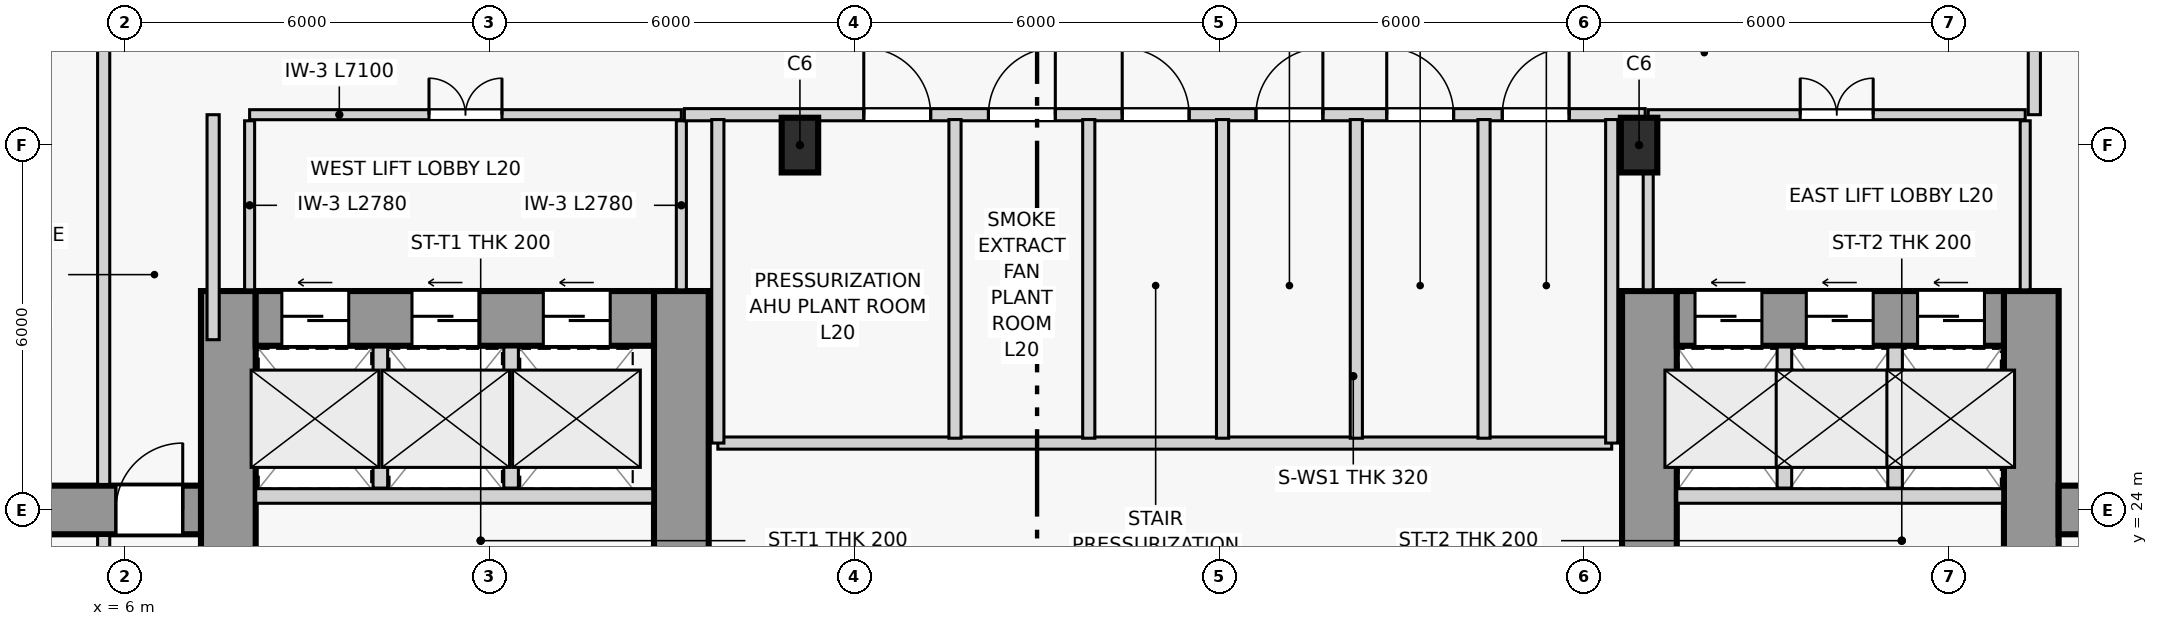
"""IFC4 building model, lengths in metres.
Left out: names, types, materials, properties, quantities, classifications, styles, units other than length and angle.
Written with IfcOpenShell. Run it as: python <this file> out.ifc"""

import sys

from ifc_helpers import new_model, si_unit, direction, frame, frame_2d, origin, origin_2d, place, context, subcontext, project, spatial, rectangle, extrude, source, transform, mapped, element, fill, save


model = new_model("IFC4")
c1 = context("Model", 3, precision=1e-05, world=origin(), true_north=direction((0.0, 1.0)))
c2 = subcontext(c1, "Body", "Model", "MODEL_VIEW")
j1 = project(units=[si_unit("LENGTHUNIT", "METRE"), si_unit("PLANEANGLEUNIT", "RADIAN")], contexts=[c1])
p1 = place(None, origin())
s1 = spatial("IfcSite", under=j1, at=p1, CompositionType="ELEMENT")
p2 = place(p1, origin())
s2 = spatial("IfcBuilding", under=s1, at=p2, CompositionType="ELEMENT")
p3 = place(p2, frame((0.0, 0.0, 76.5)))
s3 = spatial("IfcBuildingStorey", under=s2, at=p3, CompositionType="ELEMENT", Elevation=76.5)
p4 = place(p3, frame((7.7, 14.45, 0.0), z_axis=(0.0, 0.0, 1.0), x_axis=(0.0, 1.0, 0.0)))
e1 = element("IfcWall", 1, at=p4, inside=s3, PredefinedType="SHEAR", context=c2, shape_type="SweptSolid", body=[
    extrude(rectangle(XDim=13.15, YDim=0.9, at=frame_2d((6.575, 0.0))), origin(), (0.0, 0.0, 1.0), 7.2),
])
p5 = place(p3, frame((15.15, 14.45, 0.0), z_axis=(0.0, 0.0, 1.0), x_axis=(0.0, 1.0, 0.0)))
e2 = element("IfcWall", 2, at=p5, inside=s3, PredefinedType="SHEAR", context=c2, shape_type="SweptSolid", body=[
    extrude(rectangle(XDim=13.15, YDim=0.9, at=frame_2d((6.575, 0.0))), origin(), (0.0, 0.0, 1.0), 7.2),
])
p6 = place(p5, frame((5.65, 0.0, 0.0)))
e3 = element("IfcOpeningElement", 3, at=p6, cuts=e2, PredefinedType="OPENING", context=c2, shape_type="SweptSolid", body=[
    extrude(rectangle(XDim=1.1, YDim=2.2, at=frame_2d((0.55, 1.1))), frame((0.0, 0.46, 0.0), z_axis=(0.0, -1.0, 0.0), x_axis=(1.0, 0.0, 0.0)), (0.0, 0.0, 1.0), 0.92),
])
p7 = place(p3, frame((8.15, 27.15, 0.0), z_axis=(0.0, 0.0, 1.0), x_axis=(1.0, 0.0, 0.0)))
e4 = element("IfcWall", 4, at=p7, inside=s3, PredefinedType="SHEAR", context=c2, shape_type="SweptSolid", body=[
    extrude(rectangle(XDim=6.55, YDim=0.9, at=frame_2d((3.275, 0.0))), origin(), (0.0, 0.0, 1.0), 7.2),
])
p8 = place(p7, frame((0.43, 0.0, 0.0)))
e5 = element("IfcOpeningElement", 5, at=p8, cuts=e4, PredefinedType="OPENING", context=c2, shape_type="SweptSolid", body=[
    extrude(rectangle(XDim=1.1, YDim=2.2, at=frame_2d((0.55, 1.1))), frame((0.0, 0.46, 0.0), z_axis=(0.0, -1.0, 0.0), x_axis=(1.0, 0.0, 0.0)), (0.0, 0.0, 1.0), 0.92),
])
p9 = place(p7, frame((2.57, 0.0, 0.0)))
e6 = element("IfcOpeningElement", 6, at=p9, cuts=e4, PredefinedType="OPENING", context=c2, shape_type="SweptSolid", body=[
    extrude(rectangle(XDim=1.1, YDim=2.2, at=frame_2d((0.55, 1.1))), frame((0.0, 0.46, 0.0), z_axis=(0.0, -1.0, 0.0), x_axis=(1.0, 0.0, 0.0)), (0.0, 0.0, 1.0), 0.92),
])
p10 = place(p7, frame((4.73, 0.0, 0.0)))
e7 = element("IfcOpeningElement", 7, at=p10, cuts=e4, PredefinedType="OPENING", context=c2, shape_type="SweptSolid", body=[
    extrude(rectangle(XDim=1.1, YDim=2.2, at=frame_2d((0.55, 1.1))), frame((0.0, 0.46, 0.0), z_axis=(0.0, -1.0, 0.0), x_axis=(1.0, 0.0, 0.0)), (0.0, 0.0, 1.0), 0.92),
])
p11 = place(p3, frame((31.07, 14.45, 0.0), z_axis=(0.0, 0.0, 1.0), x_axis=(0.0, 1.0, 0.0)))
e8 = element("IfcWall", 8, at=p11, inside=s3, PredefinedType="SHEAR", context=c2, shape_type="SweptSolid", body=[
    extrude(rectangle(XDim=13.15, YDim=0.9, at=frame_2d((6.575, 0.0))), origin(), (0.0, 0.0, 1.0), 7.2),
])
p12 = place(p3, frame((37.35, 14.45, 0.0), z_axis=(0.0, 0.0, 1.0), x_axis=(0.0, 1.0, 0.0)))
e9 = element("IfcWall", 9, at=p12, inside=s3, PredefinedType="SHEAR", context=c2, shape_type="SweptSolid", body=[
    extrude(rectangle(XDim=13.15, YDim=0.9, at=frame_2d((6.575, 0.0))), origin(), (0.0, 0.0, 1.0), 7.2),
])
p13 = place(p12, frame((5.65, 0.0, 0.0)))
e10 = element("IfcOpeningElement", 10, at=p13, cuts=e9, PredefinedType="OPENING", context=c2, shape_type="SweptSolid", body=[
    extrude(rectangle(XDim=1.1, YDim=2.2, at=frame_2d((0.55, 1.1))), frame((0.0, 0.46, 0.0), z_axis=(0.0, -1.0, 0.0), x_axis=(1.0, 0.0, 0.0)), (0.0, 0.0, 1.0), 0.92),
])
p14 = place(p3, frame((31.52, 27.15, 0.0), z_axis=(0.0, 0.0, 1.0), x_axis=(1.0, 0.0, 0.0)))
e11 = element("IfcWall", 11, at=p14, inside=s3, PredefinedType="SHEAR", context=c2, shape_type="SweptSolid", body=[
    extrude(rectangle(XDim=5.38, YDim=0.9, at=frame_2d((2.69, 0.0))), origin(), (0.0, 0.0, 1.0), 7.2),
])
p15 = place(p14, frame((0.3, 0.0, 0.0)))
e12 = element("IfcOpeningElement", 12, at=p15, cuts=e11, PredefinedType="OPENING", context=c2, shape_type="SweptSolid", body=[
    extrude(rectangle(XDim=1.1, YDim=2.2, at=frame_2d((0.55, 1.1))), frame((0.0, 0.46, 0.0), z_axis=(0.0, -1.0, 0.0), x_axis=(1.0, 0.0, 0.0)), (0.0, 0.0, 1.0), 0.92),
])
p16 = place(p14, frame((2.13, 0.0, 0.0)))
e13 = element("IfcOpeningElement", 13, at=p16, cuts=e11, PredefinedType="OPENING", context=c2, shape_type="SweptSolid", body=[
    extrude(rectangle(XDim=1.1, YDim=2.2, at=frame_2d((0.55, 1.1))), frame((0.0, 0.46, 0.0), z_axis=(0.0, -1.0, 0.0), x_axis=(1.0, 0.0, 0.0)), (0.0, 0.0, 1.0), 0.92),
])
p17 = place(p14, frame((3.96, 0.0, 0.0)))
e14 = element("IfcOpeningElement", 14, at=p17, cuts=e11, PredefinedType="OPENING", context=c2, shape_type="SweptSolid", body=[
    extrude(rectangle(XDim=1.1, YDim=2.2, at=frame_2d((0.55, 1.1))), frame((0.0, 0.46, 0.0), z_axis=(0.0, -1.0, 0.0), x_axis=(1.0, 0.0, 0.0)), (0.0, 0.0, 1.0), 0.92),
])
m1 = source(origin(), c2, "Body", "SweptSolid", [
    extrude(rectangle(XDim=0.6, YDim=0.9, at=origin_2d()), origin(), (0.0, 0.0, 1.0), 7.2),
])
for number, where, z_axis, x_axis in (
    (15, (17.1, 30.0, 0.0), (0.0, 0.0, 1.0), (1.0, 0.0, 0.0)),
    (16, (30.9, 30.0, 0.0), (0.0, 0.0, 1.0), (1.0, 0.0, 0.0)),
):
    element("IfcColumn", number, at=place(p3, frame(where, z_axis=z_axis, x_axis=x_axis)), inside=s3, PredefinedType="COLUMN", context=c2, shape_type="MappedRepresentation", body=[
        mapped(m1, transform((0.0, 0.0, 0.0), scale=1.0)),
    ])
p18 = place(p3, frame((0.65, 24.0, 0.0), z_axis=(0.0, 0.0, 1.0), x_axis=(1.0, 0.0, 0.0)))
e17 = element("IfcWall", 17, at=p18, inside=s3, PredefinedType="SOLIDWALL", context=c2, shape_type="SweptSolid", body=[
    extrude(rectangle(XDim=6.6, YDim=0.8, at=frame_2d((3.3, 0.0))), origin(), (0.0, 0.0, 1.0), 6.55),
])
p19 = place(p18, frame((5.2, 0.0, 0.0)))
e18 = element("IfcOpeningElement", 18, at=p19, cuts=e17, PredefinedType="OPENING", context=c2, shape_type="SweptSolid", body=[
    extrude(rectangle(XDim=1.1, YDim=2.2, at=frame_2d((0.55, 1.1))), frame((0.0, 0.41, 0.0), z_axis=(0.0, -1.0, 0.0), x_axis=(1.0, 0.0, 0.0)), (0.0, 0.0, 1.0), 0.82),
])
p20 = place(p3, frame((37.8, 24.0, 0.0), z_axis=(0.0, 0.0, 1.0), x_axis=(1.0, 0.0, 0.0)))
e19 = element("IfcWall", 19, at=p20, inside=s3, PredefinedType="SOLIDWALL", context=c2, shape_type="SweptSolid", body=[
    extrude(rectangle(XDim=9.55, YDim=0.8, at=frame_2d((4.775, 0.0))), origin(), (0.0, 0.0, 1.0), 6.55),
])
p21 = place(p3, frame((8.15, 24.23, 0.0), z_axis=(0.0, 0.0, 1.0), x_axis=(1.0, 0.0, 0.0)))
e20 = element("IfcWall", 20, at=p21, inside=s3, PredefinedType="PARTITIONING", context=c2, shape_type="SweptSolid", body=[
    extrude(rectangle(XDim=6.53, YDim=0.24, at=frame_2d((3.265, 0.0))), origin(), (0.0, 0.0, 1.0), 6.55),
])
for number, where, z_axis, x_axis in (
    (21, (10.2, 24.36, 0.0), (0.0, 0.0, 1.0), (0.0, 1.0, 0.0)),
    (22, (12.35, 24.36, 0.0), (0.0, 0.0, 1.0), (0.0, 1.0, 0.0)),
):
    element("IfcWall", number, at=place(p3, frame(where, z_axis=z_axis, x_axis=x_axis)), inside=s3, PredefinedType="PARTITIONING", context=c2, shape_type="SweptSolid", body=[
        extrude(rectangle(XDim=2.32, YDim=0.24, at=frame_2d((1.16, 0.0))), origin(), (0.0, 0.0, 1.0), 6.55),
    ])
p22 = place(p3, frame((31.52, 24.23, 0.0), z_axis=(0.0, 0.0, 1.0), x_axis=(1.0, 0.0, 0.0)))
e23 = element("IfcWall", 23, at=p22, inside=s3, PredefinedType="PARTITIONING", context=c2, shape_type="SweptSolid", body=[
    extrude(rectangle(XDim=5.36, YDim=0.24, at=frame_2d((2.68, 0.0))), origin(), (0.0, 0.0, 1.0), 6.55),
])
for number, where, z_axis, x_axis in (
    (24, (33.29, 24.36, 0.0), (0.0, 0.0, 1.0), (0.0, 1.0, 0.0)),
    (25, (35.11, 24.36, 0.0), (0.0, 0.0, 1.0), (0.0, 1.0, 0.0)),
):
    element("IfcWall", number, at=place(p3, frame(where, z_axis=z_axis, x_axis=x_axis)), inside=s3, PredefinedType="PARTITIONING", context=c2, shape_type="SweptSolid", body=[
        extrude(rectangle(XDim=2.32, YDim=0.24, at=frame_2d((1.16, 0.0))), origin(), (0.0, 0.0, 1.0), 6.55),
    ])
p23 = place(p3, frame((8.05, 30.5, 0.0), z_axis=(0.0, 0.0, 1.0), x_axis=(1.0, 0.0, 0.0)))
e26 = element("IfcWall", 26, at=p23, inside=s3, PredefinedType="PARTITIONING", context=c2, shape_type="SweptSolid", body=[
    extrude(rectangle(XDim=7.1, YDim=0.165, at=frame_2d((3.55, 0.0))), origin(), (0.0, 0.0, 1.0), 4.95),
])
p24 = place(p23, frame((2.95, 0.0, 0.0)))
e27 = element("IfcOpeningElement", 27, at=p24, cuts=e26, PredefinedType="OPENING", context=c2, shape_type="SweptSolid", body=[
    extrude(rectangle(XDim=1.2, YDim=2.2, at=frame_2d((0.6, 1.1))), frame((0.0, 0.093, 0.0), z_axis=(0.0, -1.0, 0.0), x_axis=(1.0, 0.0, 0.0)), (0.0, 0.0, 1.0), 0.185),
])
for number, where, z_axis, x_axis in (
    (28, (8.05, 27.62, 0.0), (0.0, 0.0, 1.0), (0.0, 1.0, 0.0)),
    (29, (15.15, 27.62, 0.0), (0.0, 0.0, 1.0), (0.0, 1.0, 0.0)),
):
    element("IfcWall", number, at=place(p3, frame(where, z_axis=z_axis, x_axis=x_axis)), inside=s3, PredefinedType="PARTITIONING", context=c2, shape_type="SweptSolid", body=[
        extrude(rectangle(XDim=2.78, YDim=0.165, at=frame_2d((1.39, 0.0))), origin(), (0.0, 0.0, 1.0), 6.55),
    ])
p25 = place(p3, frame((31.05, 30.5, 0.0), z_axis=(0.0, 0.0, 1.0), x_axis=(1.0, 0.0, 0.0)))
e30 = element("IfcWall", 30, at=p25, inside=s3, PredefinedType="PARTITIONING", context=c2, shape_type="SweptSolid", body=[
    extrude(rectangle(XDim=6.2, YDim=0.165, at=frame_2d((3.1, 0.0))), origin(), (0.0, 0.0, 1.0), 4.95),
])
p26 = place(p25, frame((2.5, 0.0, 0.0)))
e31 = element("IfcOpeningElement", 31, at=p26, cuts=e30, PredefinedType="OPENING", context=c2, shape_type="SweptSolid", body=[
    extrude(rectangle(XDim=1.2, YDim=2.2, at=frame_2d((0.6, 1.1))), frame((0.0, 0.093, 0.0), z_axis=(0.0, -1.0, 0.0), x_axis=(1.0, 0.0, 0.0)), (0.0, 0.0, 1.0), 0.185),
])
p27 = place(p3, frame((31.05, 27.62, 0.0), z_axis=(0.0, 0.0, 1.0), x_axis=(0.0, 1.0, 0.0)))
e32 = element("IfcWall", 32, at=p27, inside=s3, PredefinedType="PARTITIONING", context=c2, shape_type="SweptSolid", body=[
    extrude(rectangle(XDim=2.78, YDim=0.165, at=frame_2d((1.39, 0.0))), origin(), (0.0, 0.0, 1.0), 4.95),
])
p28 = place(p3, frame((37.25, 27.62, 0.0), z_axis=(0.0, 0.0, 1.0), x_axis=(0.0, 1.0, 0.0)))
e33 = element("IfcWall", 33, at=p28, inside=s3, PredefinedType="PARTITIONING", context=c2, shape_type="SweptSolid", body=[
    extrude(rectangle(XDim=2.78, YDim=0.165, at=frame_2d((1.39, 0.0))), origin(), (0.0, 0.0, 1.0), 6.55),
])
p29 = place(p3, frame((15.2, 30.5, 0.0), z_axis=(0.0, 0.0, 1.0), x_axis=(1.0, 0.0, 0.0)))
e34 = element("IfcWall", 34, at=p29, inside=s3, PredefinedType="PARTITIONING", context=c2, shape_type="SweptSolid", body=[
    extrude(rectangle(XDim=15.8, YDim=0.2, at=frame_2d((7.9, 0.0))), origin(), (0.0, 0.0, 1.0), 4.95),
])
p30 = place(p29, frame((2.95, 0.0, 0.0)))
e35 = element("IfcOpeningElement", 35, at=p30, cuts=e34, PredefinedType="OPENING", context=c2, shape_type="SweptSolid", body=[
    extrude(rectangle(XDim=1.1, YDim=2.2, at=frame_2d((0.55, 1.1))), frame((0.0, 0.11, 0.0), z_axis=(0.0, -1.0, 0.0), x_axis=(1.0, 0.0, 0.0)), (0.0, 0.0, 1.0), 0.22),
])
p31 = place(p29, frame((5.0, 0.0, 0.0)))
e36 = element("IfcOpeningElement", 36, at=p31, cuts=e34, PredefinedType="OPENING", context=c2, shape_type="SweptSolid", body=[
    extrude(rectangle(XDim=1.1, YDim=2.2, at=frame_2d((0.55, 1.1))), frame((0.0, 0.11, 0.0), z_axis=(0.0, -1.0, 0.0), x_axis=(1.0, 0.0, 0.0)), (0.0, 0.0, 1.0), 0.22),
])
p32 = place(p29, frame((7.2, 0.0, 0.0)))
e37 = element("IfcOpeningElement", 37, at=p32, cuts=e34, PredefinedType="OPENING", context=c2, shape_type="SweptSolid", body=[
    extrude(rectangle(XDim=1.1, YDim=2.2, at=frame_2d((0.55, 1.1))), frame((0.0, 0.11, 0.0), z_axis=(0.0, -1.0, 0.0), x_axis=(1.0, 0.0, 0.0)), (0.0, 0.0, 1.0), 0.22),
])
p33 = place(p29, frame((9.4, 0.0, 0.0)))
e38 = element("IfcOpeningElement", 38, at=p33, cuts=e34, PredefinedType="OPENING", context=c2, shape_type="SweptSolid", body=[
    extrude(rectangle(XDim=1.1, YDim=2.2, at=frame_2d((0.55, 1.1))), frame((0.0, 0.11, 0.0), z_axis=(0.0, -1.0, 0.0), x_axis=(1.0, 0.0, 0.0)), (0.0, 0.0, 1.0), 0.22),
])
p34 = place(p29, frame((11.55, 0.0, 0.0)))
e39 = element("IfcOpeningElement", 39, at=p34, cuts=e34, PredefinedType="OPENING", context=c2, shape_type="SweptSolid", body=[
    extrude(rectangle(XDim=1.1, YDim=2.2, at=frame_2d((0.55, 1.1))), frame((0.0, 0.11, 0.0), z_axis=(0.0, -1.0, 0.0), x_axis=(1.0, 0.0, 0.0)), (0.0, 0.0, 1.0), 0.22),
])
p35 = place(p29, frame((13.45, 0.0, 0.0)))
e40 = element("IfcOpeningElement", 40, at=p35, cuts=e34, PredefinedType="OPENING", context=c2, shape_type="SweptSolid", body=[
    extrude(rectangle(XDim=1.1, YDim=2.2, at=frame_2d((0.55, 1.1))), frame((0.0, 0.11, 0.0), z_axis=(0.0, -1.0, 0.0), x_axis=(1.0, 0.0, 0.0)), (0.0, 0.0, 1.0), 0.22),
])
p36 = place(p3, frame((37.4, 30.5, 0.0), z_axis=(0.0, 0.0, 1.0), x_axis=(0.0, 1.0, 0.0)))
e41 = element("IfcWall", 41, at=p36, inside=s3, PredefinedType="PARTITIONING", context=c2, shape_type="SweptSolid", body=[
    extrude(rectangle(XDim=2.0, YDim=0.2, at=frame_2d((1.0, 0.0))), origin(), (0.0, 0.0, 1.0), 6.55),
])
p37 = place(p3, frame((15.75, 25.1, 0.0), z_axis=(0.0, 0.0, 1.0), x_axis=(1.0, 0.0, 0.0)))
e42 = element("IfcWall", 42, at=p37, inside=s3, PredefinedType="PARTITIONING", context=c2, shape_type="SweptSolid", body=[
    extrude(rectangle(XDim=14.7, YDim=0.2, at=frame_2d((7.35, 0.0))), origin(), (0.0, 0.0, 1.0), 6.55),
])
p38 = place(p3, frame((15.75, 25.1, 0.0), z_axis=(0.0, 0.0, 1.0), x_axis=(0.0, 1.0, 0.0)))
e43 = element("IfcWall", 43, at=p38, inside=s3, PredefinedType="PARTITIONING", context=c2, shape_type="SweptSolid", body=[
    extrude(rectangle(XDim=5.32, YDim=0.2, at=frame_2d((2.66, 0.0))), origin(), (0.0, 0.0, 1.0), 6.55),
])
p39 = place(p3, frame((30.45, 25.1, 0.0), z_axis=(0.0, 0.0, 1.0), x_axis=(0.0, 1.0, 0.0)))
e44 = element("IfcWall", 44, at=p39, inside=s3, PredefinedType="PARTITIONING", context=c2, shape_type="SweptSolid", body=[
    extrude(rectangle(XDim=5.32, YDim=0.2, at=frame_2d((2.66, 0.0))), origin(), (0.0, 0.0, 1.0), 4.95),
])
for number, where, z_axis, x_axis in (
    (45, (19.65, 25.18, 0.0), (0.0, 0.0, 1.0), (0.0, 1.0, 0.0)),
    (46, (21.85, 25.18, 0.0), (0.0, 0.0, 1.0), (0.0, 1.0, 0.0)),
    (47, (24.05, 25.18, 0.0), (0.0, 0.0, 1.0), (0.0, 1.0, 0.0)),
    (48, (26.25, 25.18, 0.0), (0.0, 0.0, 1.0), (0.0, 1.0, 0.0)),
    (49, (28.35, 25.18, 0.0), (0.0, 0.0, 1.0), (0.0, 1.0, 0.0)),
):
    element("IfcWall", number, at=place(p3, frame(where, z_axis=z_axis, x_axis=x_axis)), inside=s3, PredefinedType="PARTITIONING", context=c2, shape_type="SweptSolid", body=[
        extrude(rectangle(XDim=5.24, YDim=0.2, at=frame_2d((2.62, 0.0))), origin(), (0.0, 0.0, 1.0), 6.55),
    ])
p40 = place(p3, frame((5.65, 18.42, 0.0), z_axis=(0.0, 0.0, 1.0), x_axis=(0.0, 1.0, 0.0)))
e50 = element("IfcWall", 50, at=p40, inside=s3, PredefinedType="PARTITIONING", context=c2, shape_type="SweptSolid", body=[
    extrude(rectangle(XDim=5.16, YDim=0.2, at=frame_2d((2.58, 0.0))), origin(), (0.0, 0.0, 1.0), 6.55),
])
p41 = place(p3, frame((5.65, 24.42, 0.0), z_axis=(0.0, 0.0, 1.0), x_axis=(0.0, 1.0, 0.0)))
e51 = element("IfcWall", 51, at=p41, inside=s3, PredefinedType="PARTITIONING", context=c2, shape_type="SweptSolid", body=[
    extrude(rectangle(XDim=8.08, YDim=0.2, at=frame_2d((4.04, 0.0))), origin(), (0.0, 0.0, 1.0), 4.95),
])
p42 = place(p3, frame((7.45, 26.8, 0.0), z_axis=(0.0, 0.0, 1.0), x_axis=(0.0, 1.0, 0.0)))
e52 = element("IfcWall", 52, at=p42, inside=s3, PredefinedType="PARTITIONING", context=c2, shape_type="SweptSolid", body=[
    extrude(rectangle(XDim=3.7, YDim=0.2, at=frame_2d((1.85, 0.0))), origin(), (0.0, 0.0, 1.0), 6.55),
])
m2 = source(origin(), c2, "Body", "SweptSolid", [
    extrude(rectangle(XDim=1.1, YDim=2.2, at=frame_2d((0.55, 1.1))), frame((0.0, 0.025, 0.0), z_axis=(0.0, -1.0, 0.0), x_axis=(1.0, 0.0, 0.0)), (0.0, 0.0, 1.0), 0.05),
])
p43 = place(p8, origin())
e53 = element("IfcDoor", 53, at=p43, inside=s3, OperationType="SLIDING_TO_LEFT", PredefinedType="DOOR", context=c2, shape_type="MappedRepresentation", body=[
    mapped(m2, transform((0.0, 0.0, 0.0), scale=1.0)),
])
fill(e5, e53)
p44 = place(p9, origin())
e54 = element("IfcDoor", 54, at=p44, inside=s3, OperationType="SLIDING_TO_LEFT", PredefinedType="DOOR", context=c2, shape_type="MappedRepresentation", body=[
    mapped(m2, transform((0.0, 0.0, 0.0), scale=1.0)),
])
fill(e6, e54)
p45 = place(p10, origin())
e55 = element("IfcDoor", 55, at=p45, inside=s3, OperationType="SLIDING_TO_LEFT", PredefinedType="DOOR", context=c2, shape_type="MappedRepresentation", body=[
    mapped(m2, transform((0.0, 0.0, 0.0), scale=1.0)),
])
fill(e7, e55)
p46 = place(p15, origin())
e56 = element("IfcDoor", 56, at=p46, inside=s3, OperationType="SLIDING_TO_LEFT", PredefinedType="DOOR", context=c2, shape_type="MappedRepresentation", body=[
    mapped(m2, transform((0.0, 0.0, 0.0), scale=1.0)),
])
fill(e12, e56)
p47 = place(p16, origin())
e57 = element("IfcDoor", 57, at=p47, inside=s3, OperationType="SLIDING_TO_LEFT", PredefinedType="DOOR", context=c2, shape_type="MappedRepresentation", body=[
    mapped(m2, transform((0.0, 0.0, 0.0), scale=1.0)),
])
fill(e13, e57)
p48 = place(p17, origin())
e58 = element("IfcDoor", 58, at=p48, inside=s3, OperationType="SLIDING_TO_LEFT", PredefinedType="DOOR", context=c2, shape_type="MappedRepresentation", body=[
    mapped(m2, transform((0.0, 0.0, 0.0), scale=1.0)),
])
fill(e14, e58)
m3 = source(origin(), c2, "Body", "SweptSolid", [
    extrude(rectangle(XDim=1.2, YDim=2.2, at=frame_2d((0.6, 1.1))), frame((0.0, 0.025, 0.0), z_axis=(0.0, -1.0, 0.0), x_axis=(1.0, 0.0, 0.0)), (0.0, 0.0, 1.0), 0.05),
])
p49 = place(p24, origin())
e59 = element("IfcDoor", 59, at=p49, inside=s3, OperationType="DOUBLE_DOOR_SINGLE_SWING", PredefinedType="DOOR", context=c2, shape_type="MappedRepresentation", body=[
    mapped(m3, transform((0.0, 0.0, 0.0), scale=1.0)),
])
fill(e27, e59)
p50 = place(p26, origin())
e60 = element("IfcDoor", 60, at=p50, inside=s3, OperationType="DOUBLE_DOOR_SINGLE_SWING", PredefinedType="DOOR", context=c2, shape_type="MappedRepresentation", body=[
    mapped(m3, transform((0.0, 0.0, 0.0), scale=1.0)),
])
fill(e31, e60)
m4 = source(origin(), c2, "Body", "SweptSolid", [
    extrude(rectangle(XDim=1.1, YDim=2.2, at=frame_2d((0.55, 1.1))), frame((0.0, 0.025, 0.0), z_axis=(0.0, -1.0, 0.0), x_axis=(1.0, 0.0, 0.0)), (0.0, 0.0, 1.0), 0.05),
])
p51 = place(p30, origin())
e61 = element("IfcDoor", 61, at=p51, inside=s3, OperationType="SINGLE_SWING_LEFT", PredefinedType="DOOR", context=c2, shape_type="MappedRepresentation", body=[
    mapped(m4, transform((0.0, 0.0, 0.0), scale=1.0)),
])
fill(e35, e61)
p52 = place(p31, origin())
e62 = element("IfcDoor", 62, at=p52, inside=s3, OperationType="SINGLE_SWING_RIGHT", PredefinedType="DOOR", context=c2, shape_type="MappedRepresentation", body=[
    mapped(m4, transform((0.0, 0.0, 0.0), scale=1.0)),
])
fill(e36, e62)
p53 = place(p32, origin())
e63 = element("IfcDoor", 63, at=p53, inside=s3, OperationType="SINGLE_SWING_LEFT", PredefinedType="DOOR", context=c2, shape_type="MappedRepresentation", body=[
    mapped(m4, transform((0.0, 0.0, 0.0), scale=1.0)),
])
fill(e37, e63)
p54 = place(p33, origin())
e64 = element("IfcDoor", 64, at=p54, inside=s3, OperationType="SINGLE_SWING_RIGHT", PredefinedType="DOOR", context=c2, shape_type="MappedRepresentation", body=[
    mapped(m4, transform((0.0, 0.0, 0.0), scale=1.0)),
])
fill(e38, e64)
p55 = place(p34, origin())
e65 = element("IfcDoor", 65, at=p55, inside=s3, OperationType="SINGLE_SWING_LEFT", PredefinedType="DOOR", context=c2, shape_type="MappedRepresentation", body=[
    mapped(m4, transform((0.0, 0.0, 0.0), scale=1.0)),
])
fill(e39, e65)
p56 = place(p35, origin())
e66 = element("IfcDoor", 66, at=p56, inside=s3, OperationType="SINGLE_SWING_RIGHT", PredefinedType="DOOR", context=c2, shape_type="MappedRepresentation", body=[
    mapped(m4, transform((0.0, 0.0, 0.0), scale=1.0)),
])
fill(e40, e66)
p57 = place(p19, origin())
e67 = element("IfcDoor", 67, at=p57, inside=s3, OperationType="SINGLE_SWING_RIGHT", PredefinedType="DOOR", context=c2, shape_type="MappedRepresentation", body=[
    mapped(m4, transform((0.0, 0.0, 0.0), scale=1.0)),
])
fill(e18, e67)
save(model, sys.argv[1])
